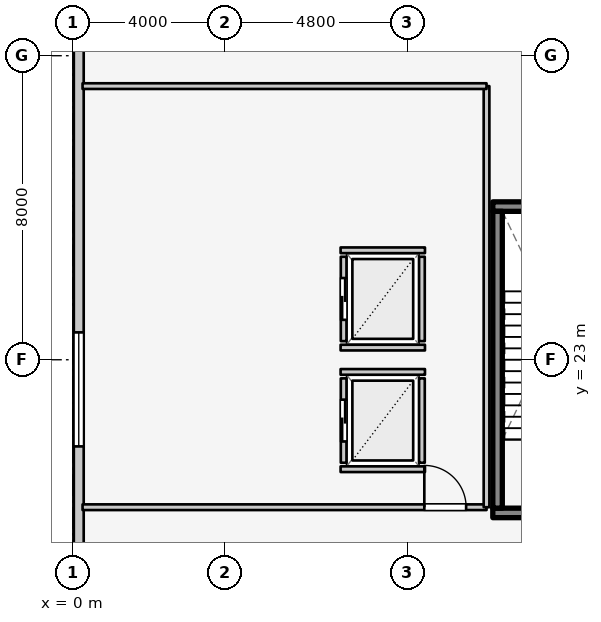
"""IFC4 building model, lengths in metres.
Left out: names, types, materials, properties, quantities, classifications, styles, units other than length and angle.
Written with IfcOpenShell. Run it as: python <this file> out.ifc"""

import sys

from ifc_helpers import new_model, si_unit, direction, frame, frame_2d, origin, place, context, subcontext, project, spatial, rectangle, extrude, element, fill, save


model = new_model("IFC4")
c1 = context("Model", 3, precision=1e-05, world=origin(), true_north=direction((0.0, 1.0)))
c2 = subcontext(c1, "Body", "Model", "MODEL_VIEW")
j1 = project(units=[si_unit("LENGTHUNIT", "METRE"), si_unit("PLANEANGLEUNIT", "RADIAN")], contexts=[c1])
p1 = place(None, origin())
s1 = spatial("IfcSite", under=j1, at=p1, CompositionType="ELEMENT")
p2 = place(p1, origin())
s2 = spatial("IfcBuilding", under=s1, at=p2, CompositionType="ELEMENT")
p3 = place(p2, frame((0.0, 0.0, 4.6)))
s3 = spatial("IfcBuildingStorey", under=s2, at=p3, CompositionType="ELEMENT", Elevation=4.6)
p4 = place(p3, frame((11.045, 18.97, 0.0), z_axis=(0.0, 0.0, 1.0), x_axis=(1.0, 0.0, 0.0)))
e1 = element("IfcWall", 1, at=p4, inside=s3, PredefinedType="SOLIDWALL", context=c2, shape_type="SweptSolid", body=[
    extrude(rectangle(XDim=3.782, YDim=0.25, at=frame_2d((1.891, 0.0))), origin(), (0.0, 0.0, 1.0), 4.6),
])
p5 = place(p4, frame((1.135, 0.0, 0.0)))
e2 = element("IfcOpeningElement", 2, at=p5, cuts=e1, PredefinedType="OPENING", context=c2, shape_type="SweptSolid", body=[
    extrude(rectangle(XDim=1.1, YDim=2.1, at=frame_2d((0.55, 1.05))), frame((0.0, 0.135, 0.0), z_axis=(0.0, -1.0, 0.0), x_axis=(1.0, 0.0, 0.0)), (0.0, 0.0, 1.0), 0.27),
])
p6 = place(p3, frame((11.045, 27.03, 0.0), z_axis=(0.0, 0.0, 1.0), x_axis=(1.0, 0.0, 0.0)))
e3 = element("IfcWall", 3, at=p6, inside=s3, PredefinedType="SOLIDWALL", context=c2, shape_type="SweptSolid", body=[
    extrude(rectangle(XDim=3.782, YDim=0.25, at=frame_2d((1.891, 0.0))), origin(), (0.0, 0.0, 1.0), 4.6),
])
p7 = place(p3, frame((11.17, 19.095, 0.0), z_axis=(0.0, 0.0, 1.0), x_axis=(0.0, 1.0, 0.0)))
e4 = element("IfcWall", 4, at=p7, inside=s3, PredefinedType="SOLIDWALL", context=c2, shape_type="SweptSolid", body=[
    extrude(rectangle(XDim=7.81, YDim=0.25, at=frame_2d((3.905, 0.0))), origin(), (0.0, 0.0, 1.0), 4.6),
])
p8 = place(p3, frame((0.15, 45.72, 0.0), z_axis=(0.0, 0.0, 1.0), x_axis=(0.0, -1.0, 0.0)))
e5 = element("IfcWall", 5, at=p8, inside=s3, PredefinedType="STANDARD", context=c2, shape_type="SweptSolid", body=[
    extrude(rectangle(XDim=45.44, YDim=0.26, at=frame_2d((22.72, 0.0))), origin(), (0.0, 0.0, 1.0), 4.28),
])
p9 = place(p8, frame((6.0, 0.0, 0.9)))
e6 = element("IfcOpeningElement", 6, at=p9, cuts=e5, PredefinedType="OPENING", context=c2, shape_type="SweptSolid", body=[
    extrude(rectangle(XDim=3.0, YDim=2.4, at=frame_2d((1.5, 1.2))), frame((0.0, 0.14, 0.0), z_axis=(0.0, -1.0, 0.0), x_axis=(1.0, 0.0, 0.0)), (0.0, 0.0, 1.0), 0.28),
])
p10 = place(p8, frame((22.0, 0.0, 0.9)))
e7 = element("IfcOpeningElement", 7, at=p10, cuts=e5, PredefinedType="OPENING", context=c2, shape_type="SweptSolid", body=[
    extrude(rectangle(XDim=3.0, YDim=2.4, at=frame_2d((1.5, 1.2))), frame((0.0, 0.14, 0.0), z_axis=(0.0, -1.0, 0.0), x_axis=(1.0, 0.0, 0.0)), (0.0, 0.0, 1.0), 0.28),
])
p11 = place(p8, frame((38.0, 0.0, 0.9)))
e8 = element("IfcOpeningElement", 8, at=p11, cuts=e5, PredefinedType="OPENING", context=c2, shape_type="SweptSolid", body=[
    extrude(rectangle(XDim=3.0, YDim=2.4, at=frame_2d((1.5, 1.2))), frame((0.0, 0.14, 0.0), z_axis=(0.0, -1.0, 0.0), x_axis=(1.0, 0.0, 0.0)), (0.0, 0.0, 1.0), 0.28),
])
p12 = place(p3, frame((7.12, 20.29, 0.0), z_axis=(0.0, 0.0, 1.0), x_axis=(0.0, 1.0, 0.0)))
e9 = element("IfcWall", 9, at=p12, inside=s3, PredefinedType="SOLIDWALL", context=c2, shape_type="SweptSolid", body=[
    extrude(rectangle(XDim=2.22, YDim=0.15, at=frame_2d((1.11, 0.0))), origin(), (0.0, 0.0, 1.0), 4.255),
])
p13 = place(p12, frame((0.56, 0.0, 0.0)))
e10 = element("IfcOpeningElement", 10, at=p13, cuts=e9, PredefinedType="OPENING", context=c2, shape_type="SweptSolid", body=[
    extrude(rectangle(XDim=1.1, YDim=2.1, at=frame_2d((0.55, 1.05))), frame((0.0, 0.085, 0.0), z_axis=(0.0, -1.0, 0.0), x_axis=(1.0, 0.0, 0.0)), (0.0, 0.0, 1.0), 0.17),
])
for number, where, z_axis, x_axis in (
    (11, (9.18, 20.29, 0.0), (0.0, 0.0, 1.0), (0.0, 1.0, 0.0)),
    (12, (7.04, 20.12, 0.0), (0.0, 0.0, 1.0), (1.0, 0.0, 0.0)),
    (13, (7.04, 22.68, 0.0), (0.0, 0.0, 1.0), (1.0, 0.0, 0.0)),
):
    element("IfcWall", number, at=place(p3, frame(where, z_axis=z_axis, x_axis=x_axis)), inside=s3, PredefinedType="SOLIDWALL", context=c2, shape_type="SweptSolid", body=[
        extrude(rectangle(XDim=2.22, YDim=0.15, at=frame_2d((1.11, 0.0))), origin(), (0.0, 0.0, 1.0), 4.255),
    ])
p14 = place(p3, frame((7.12, 23.49, 0.0), z_axis=(0.0, 0.0, 1.0), x_axis=(0.0, 1.0, 0.0)))
e14 = element("IfcWall", 14, at=p14, inside=s3, PredefinedType="SOLIDWALL", context=c2, shape_type="SweptSolid", body=[
    extrude(rectangle(XDim=2.22, YDim=0.15, at=frame_2d((1.11, 0.0))), origin(), (0.0, 0.0, 1.0), 4.255),
])
p15 = place(p14, frame((0.56, 0.0, 0.0)))
e15 = element("IfcOpeningElement", 15, at=p15, cuts=e14, PredefinedType="OPENING", context=c2, shape_type="SweptSolid", body=[
    extrude(rectangle(XDim=1.1, YDim=2.1, at=frame_2d((0.55, 1.05))), frame((0.0, 0.085, 0.0), z_axis=(0.0, -1.0, 0.0), x_axis=(1.0, 0.0, 0.0)), (0.0, 0.0, 1.0), 0.17),
])
for number, where, z_axis, x_axis in (
    (16, (9.18, 23.49, 0.0), (0.0, 0.0, 1.0), (0.0, 1.0, 0.0)),
    (17, (7.04, 23.32, 0.0), (0.0, 0.0, 1.0), (1.0, 0.0, 0.0)),
    (18, (7.04, 25.88, 0.0), (0.0, 0.0, 1.0), (1.0, 0.0, 0.0)),
):
    element("IfcWall", number, at=place(p3, frame(where, z_axis=z_axis, x_axis=x_axis)), inside=s3, PredefinedType="SOLIDWALL", context=c2, shape_type="SweptSolid", body=[
        extrude(rectangle(XDim=2.22, YDim=0.15, at=frame_2d((1.11, 0.0))), origin(), (0.0, 0.0, 1.0), 4.255),
    ])
p16 = place(p3, frame((0.25, 19.12, 0.0), z_axis=(0.0, 0.0, 1.0), x_axis=(1.0, 0.0, 0.0)))
e19 = element("IfcWall", 19, at=p16, inside=s3, PredefinedType="PARTITIONING", context=c2, shape_type="SweptSolid", body=[
    extrude(rectangle(XDim=10.63, YDim=0.15, at=frame_2d((5.315, 0.0))), origin(), (0.0, 0.0, 1.0), 3.3),
])
p17 = place(p16, frame((8.993, 0.0, 0.0)))
e20 = element("IfcOpeningElement", 20, at=p17, cuts=e19, PredefinedType="OPENING", context=c2, shape_type="SweptSolid", body=[
    extrude(rectangle(XDim=1.1, YDim=2.1, at=frame_2d((0.55, 1.05))), frame((0.0, 0.085, 0.0), z_axis=(0.0, -1.0, 0.0), x_axis=(1.0, 0.0, 0.0)), (0.0, 0.0, 1.0), 0.17),
])
p18 = place(p3, frame((10.88, 19.12, 0.0), z_axis=(0.0, 0.0, 1.0), x_axis=(0.0, 1.0, 0.0)))
e21 = element("IfcWall", 21, at=p18, inside=s3, PredefinedType="PARTITIONING", context=c2, shape_type="SweptSolid", body=[
    extrude(rectangle(XDim=11.08, YDim=0.15, at=frame_2d((5.54, 0.0))), origin(), (0.0, 0.0, 1.0), 3.62),
])
p19 = place(p3, frame((0.25, 30.2, 0.0), z_axis=(0.0, 0.0, 1.0), x_axis=(1.0, 0.0, 0.0)))
e22 = element("IfcWall", 22, at=p19, inside=s3, PredefinedType="PARTITIONING", context=c2, shape_type="SweptSolid", body=[
    extrude(rectangle(XDim=10.63, YDim=0.15, at=frame_2d((5.315, 0.0))), origin(), (0.0, 0.0, 1.0), 3.3),
])
p20 = place(p10, origin())
e23 = element("IfcWindow", 23, at=p20, inside=s3, PartitioningType="SINGLE_PANEL", PredefinedType="WINDOW", context=c2, shape_type="SweptSolid", body=[
    extrude(rectangle(XDim=3.0, YDim=2.4, at=frame_2d((1.5, 1.2))), frame((0.0, 0.03, 0.0), z_axis=(0.0, -1.0, 0.0), x_axis=(1.0, 0.0, 0.0)), (0.0, 0.0, 1.0), 0.06),
])
fill(e7, e23)
p21 = place(p13, origin())
e24 = element("IfcDoor", 24, at=p21, inside=s3, OperationType="DOUBLE_DOOR_SLIDING", PredefinedType="DOOR", context=c2, shape_type="SweptSolid", body=[
    extrude(rectangle(XDim=1.1, YDim=2.1, at=frame_2d((0.55, 1.05))), frame((0.0, 0.025, 0.0), z_axis=(0.0, -1.0, 0.0), x_axis=(1.0, 0.0, 0.0)), (0.0, 0.0, 1.0), 0.05),
])
fill(e10, e24)
p22 = place(p15, origin())
e25 = element("IfcDoor", 25, at=p22, inside=s3, OperationType="DOUBLE_DOOR_SLIDING", PredefinedType="DOOR", context=c2, shape_type="SweptSolid", body=[
    extrude(rectangle(XDim=1.1, YDim=2.1, at=frame_2d((0.55, 1.05))), frame((0.0, 0.025, 0.0), z_axis=(0.0, -1.0, 0.0), x_axis=(1.0, 0.0, 0.0)), (0.0, 0.0, 1.0), 0.05),
])
fill(e15, e25)
p23 = place(p17, origin())
e26 = element("IfcDoor", 26, at=p23, inside=s3, OperationType="SINGLE_SWING_LEFT", PredefinedType="DOOR", context=c2, shape_type="SweptSolid", body=[
    extrude(rectangle(XDim=1.1, YDim=2.1, at=frame_2d((0.55, 1.05))), frame((0.0, 0.025, 0.0), z_axis=(0.0, -1.0, 0.0), x_axis=(1.0, 0.0, 0.0)), (0.0, 0.0, 1.0), 0.05),
])
fill(e20, e26)
save(model, sys.argv[1])
